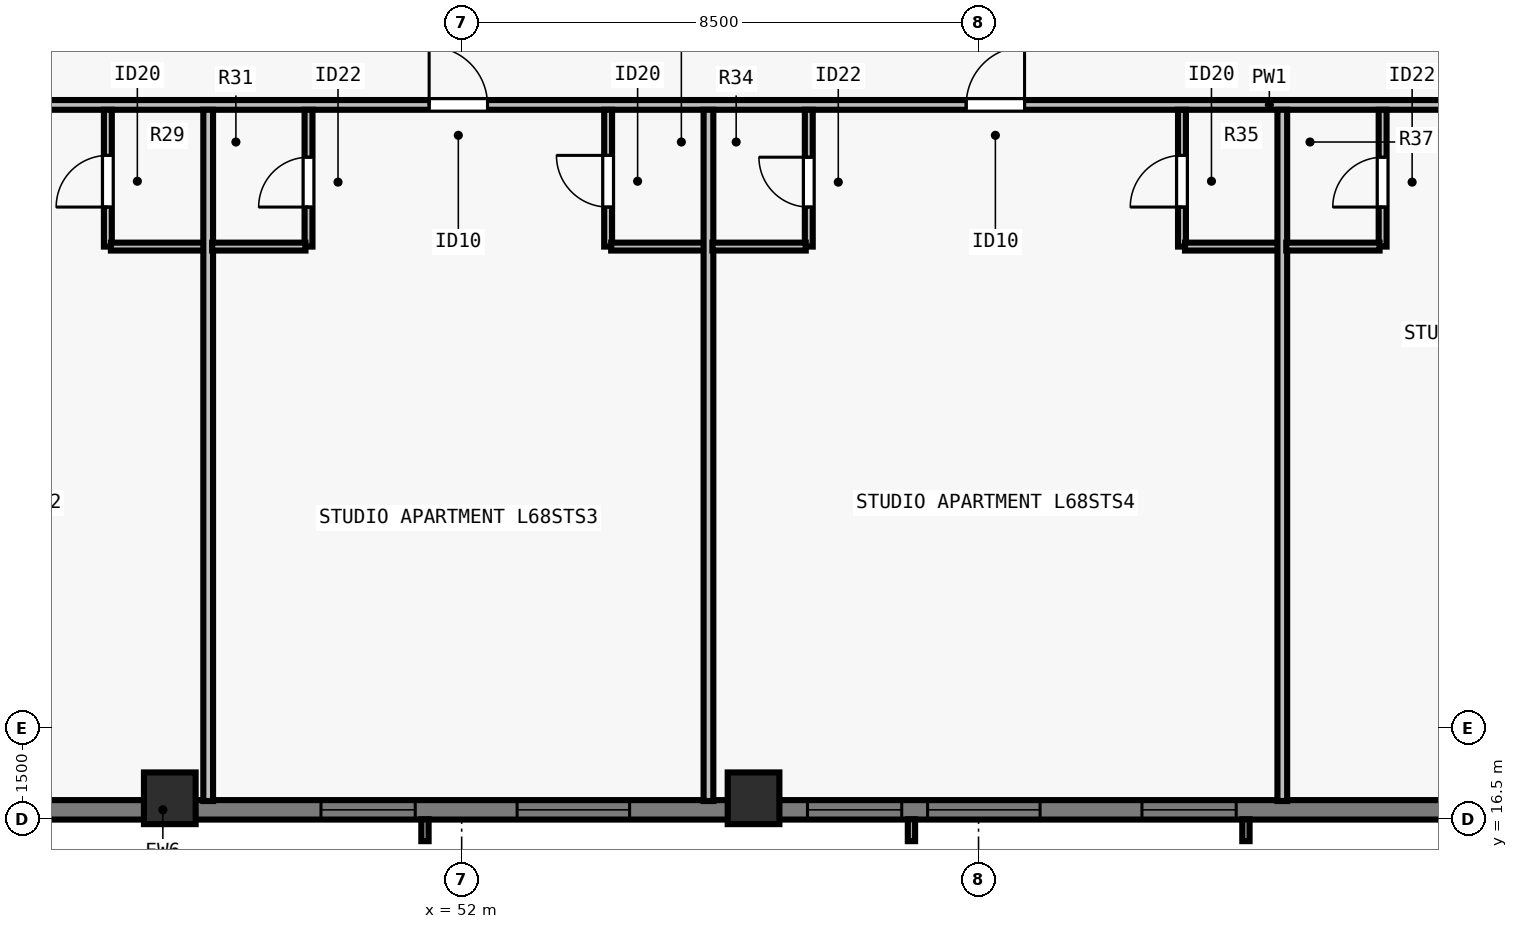
"""IFC4 building model, lengths in metres.
Left out: names, types, materials, properties, quantities, classifications, styles, units other than length and angle.
Written with IfcOpenShell. Run it as: python <this file> out.ifc"""

import sys

from ifc_helpers import new_model, si_unit, direction, frame, frame_2d, origin, origin_2d, place, context, subcontext, project, spatial, rectangle, extrude, element, fill, save


model = new_model("IFC4")
c1 = context("Model", 3, precision=1e-05, world=origin(), true_north=direction((0.0, 1.0)))
c2 = subcontext(c1, "Body", "Model", "MODEL_VIEW")
j1 = project(units=[si_unit("LENGTHUNIT", "METRE"), si_unit("PLANEANGLEUNIT", "RADIAN")], contexts=[c1])
p1 = place(None, origin())
s1 = spatial("IfcSite", under=j1, at=p1, CompositionType="ELEMENT")
p2 = place(p1, origin())
s2 = spatial("IfcBuilding", under=s1, at=p2, CompositionType="ELEMENT")
p3 = place(p2, frame((0.0, 0.0, 248.0)))
s3 = spatial("IfcBuildingStorey", under=s2, at=p3, CompositionType="ELEMENT", Elevation=248.0)
for number, where, z_axis, x_axis in (
    (1, (47.2, 16.85, 0.0), (0.0, 0.0, 1.0), (1.0, 0.0, 0.0)),
    (2, (56.8, 16.85, 0.0), (0.0, 0.0, 1.0), (1.0, 0.0, 0.0)),
):
    element("IfcColumn", number, at=place(p3, frame(where, z_axis=z_axis, x_axis=x_axis)), inside=s3, PredefinedType="COLUMN", context=c2, shape_type="SweptSolid", body=[
        extrude(rectangle(XDim=0.85, YDim=0.85, at=origin_2d()), origin(), (0.0, 0.0, 1.0), 3.5),
    ])
p4 = place(p3, frame((69.5, 16.66, 0.0), z_axis=(0.0, 0.0, 1.0), x_axis=(-1.0, 0.0, 0.0)))
e3 = element("IfcWall", 3, at=p4, inside=s3, PredefinedType="SOLIDWALL", context=c2, shape_type="SweptSolid", body=[
    extrude(rectangle(XDim=34.702, YDim=0.32, at=frame_2d((17.351, 0.0))), origin(), (0.0, 0.0, 1.0), 3.29),
])
p5 = place(p4, frame((4.763, 0.0, 0.8)))
e4 = element("IfcOpeningElement", 4, at=p5, cuts=e3, PredefinedType="OPENING", context=c2, shape_type="SweptSolid", body=[
    extrude(rectangle(XDim=1.55, YDim=1.678, at=frame_2d((0.775, 0.839))), frame((0.0, 0.17, 0.0), z_axis=(0.0, -1.0, 0.0), x_axis=(1.0, 0.0, 0.0)), (0.0, 0.0, 1.0), 0.34),
])
p6 = place(p4, frame((7.988, 0.0, 0.8)))
e5 = element("IfcOpeningElement", 5, at=p6, cuts=e3, PredefinedType="OPENING", context=c2, shape_type="SweptSolid", body=[
    extrude(rectangle(XDim=1.85, YDim=1.678, at=frame_2d((0.925, 0.839))), frame((0.0, 0.17, 0.0), z_axis=(0.0, -1.0, 0.0), x_axis=(1.0, 0.0, 0.0)), (0.0, 0.0, 1.0), 0.34),
])
p7 = place(p4, frame((10.263, 0.0, 0.8)))
e6 = element("IfcOpeningElement", 6, at=p7, cuts=e3, PredefinedType="OPENING", context=c2, shape_type="SweptSolid", body=[
    extrude(rectangle(XDim=1.55, YDim=1.678, at=frame_2d((0.775, 0.839))), frame((0.0, 0.17, 0.0), z_axis=(0.0, -1.0, 0.0), x_axis=(1.0, 0.0, 0.0)), (0.0, 0.0, 1.0), 0.34),
])
p8 = place(p4, frame((14.738, 0.0, 0.8)))
e7 = element("IfcOpeningElement", 7, at=p8, cuts=e3, PredefinedType="OPENING", context=c2, shape_type="SweptSolid", body=[
    extrude(rectangle(XDim=1.85, YDim=1.678, at=frame_2d((0.925, 0.839))), frame((0.0, 0.17, 0.0), z_axis=(0.0, -1.0, 0.0), x_axis=(1.0, 0.0, 0.0)), (0.0, 0.0, 1.0), 0.34),
])
p9 = place(p4, frame((18.264, 0.0, 0.8)))
e8 = element("IfcOpeningElement", 8, at=p9, cuts=e3, PredefinedType="OPENING", context=c2, shape_type="SweptSolid", body=[
    extrude(rectangle(XDim=1.55, YDim=1.678, at=frame_2d((0.775, 0.839))), frame((0.0, 0.17, 0.0), z_axis=(0.0, -1.0, 0.0), x_axis=(1.0, 0.0, 0.0)), (0.0, 0.0, 1.0), 0.34),
])
p10 = place(p4, frame((25.014, 0.0, 0.8)))
e9 = element("IfcOpeningElement", 9, at=p10, cuts=e3, PredefinedType="OPENING", context=c2, shape_type="SweptSolid", body=[
    extrude(rectangle(XDim=1.55, YDim=1.678, at=frame_2d((0.775, 0.839))), frame((0.0, 0.17, 0.0), z_axis=(0.0, -1.0, 0.0), x_axis=(1.0, 0.0, 0.0)), (0.0, 0.0, 1.0), 0.34),
])
p11 = place(p4, frame((28.24, 0.0, 0.8)))
e10 = element("IfcOpeningElement", 10, at=p11, cuts=e3, PredefinedType="OPENING", context=c2, shape_type="SweptSolid", body=[
    extrude(rectangle(XDim=1.85, YDim=1.678, at=frame_2d((0.925, 0.839))), frame((0.0, 0.17, 0.0), z_axis=(0.0, -1.0, 0.0), x_axis=(1.0, 0.0, 0.0)), (0.0, 0.0, 1.0), 0.34),
])
p12 = place(p3, frame((29.915, 28.252, 0.0), z_axis=(0.0, 0.0, 1.0), x_axis=(1.0, 0.0, 0.0)))
e11 = element("IfcWall", 11, at=p12, inside=s3, PredefinedType="PARTITIONING", context=c2, shape_type="SweptSolid", body=[
    extrude(rectangle(XDim=44.28, YDim=0.16, at=frame_2d((22.14, 0.0))), origin(), (0.0, 0.0, 1.0), 2.958),
])
p13 = place(p12, frame((5.002, 0.0, 0.0)))
e12 = element("IfcOpeningElement", 12, at=p13, cuts=e11, PredefinedType="OPENING", context=c2, shape_type="SweptSolid", body=[
    extrude(rectangle(XDim=0.96, YDim=2.18, at=frame_2d((0.48, 1.09))), frame((0.0, 0.09, 0.0), z_axis=(0.0, -1.0, 0.0), x_axis=(1.0, 0.0, 0.0)), (0.0, 0.0, 1.0), 0.18),
])
p14 = place(p12, frame((12.718, 0.0, 0.0)))
e13 = element("IfcOpeningElement", 13, at=p14, cuts=e11, PredefinedType="OPENING", context=c2, shape_type="SweptSolid", body=[
    extrude(rectangle(XDim=0.96, YDim=2.18, at=frame_2d((0.48, 1.09))), frame((0.0, 0.09, 0.0), z_axis=(0.0, -1.0, 0.0), x_axis=(1.0, 0.0, 0.0)), (0.0, 0.0, 1.0), 0.18),
])
p15 = place(p12, frame((21.55, 0.0, 0.0)))
e14 = element("IfcOpeningElement", 14, at=p15, cuts=e11, PredefinedType="OPENING", context=c2, shape_type="SweptSolid", body=[
    extrude(rectangle(XDim=0.96, YDim=2.18, at=frame_2d((0.48, 1.09))), frame((0.0, 0.09, 0.0), z_axis=(0.0, -1.0, 0.0), x_axis=(1.0, 0.0, 0.0)), (0.0, 0.0, 1.0), 0.18),
])
p16 = place(p12, frame((30.382, 0.0, 0.0)))
e15 = element("IfcOpeningElement", 15, at=p16, cuts=e11, PredefinedType="OPENING", context=c2, shape_type="SweptSolid", body=[
    extrude(rectangle(XDim=0.96, YDim=2.18, at=frame_2d((0.48, 1.09))), frame((0.0, 0.09, 0.0), z_axis=(0.0, -1.0, 0.0), x_axis=(1.0, 0.0, 0.0)), (0.0, 0.0, 1.0), 0.18),
])
p17 = place(p12, frame((39.393, 0.0, 0.0)))
e16 = element("IfcOpeningElement", 16, at=p17, cuts=e11, PredefinedType="OPENING", context=c2, shape_type="SweptSolid", body=[
    extrude(rectangle(XDim=0.96, YDim=2.18, at=frame_2d((0.48, 1.09))), frame((0.0, 0.09, 0.0), z_axis=(0.0, -1.0, 0.0), x_axis=(1.0, 0.0, 0.0)), (0.0, 0.0, 1.0), 0.18),
])
p18 = place(p3, frame((46.181, 25.923, 0.0), z_axis=(0.0, 0.0, 1.0), x_axis=(0.0, 1.0, 0.0)))
e17 = element("IfcWall", 17, at=p18, inside=s3, PredefinedType="PLUMBINGWALL", context=c2, shape_type="SweptSolid", body=[
    extrude(rectangle(XDim=2.25, YDim=0.13, at=frame_2d((1.125, 0.0))), origin(), (0.0, 0.0, 1.0), 3.29),
])
p19 = place(p18, frame((0.65, 0.0, 0.0)))
e18 = element("IfcOpeningElement", 18, at=p19, cuts=e17, PredefinedType="OPENING", context=c2, shape_type="SweptSolid", body=[
    extrude(rectangle(XDim=0.85, YDim=2.1, at=frame_2d((0.425, 1.05))), frame((0.0, 0.075, 0.0), z_axis=(0.0, -1.0, 0.0), x_axis=(1.0, 0.0, 0.0)), (0.0, 0.0, 1.0), 0.15),
])
p20 = place(p3, frame((46.231, 25.923, 0.0), z_axis=(0.0, 0.0, 1.0), x_axis=(1.0, 0.0, 0.0)))
e19 = element("IfcWall", 19, at=p20, inside=s3, PredefinedType="PLUMBINGWALL", context=c2, shape_type="SweptSolid", body=[
    extrude(rectangle(XDim=1.6, YDim=0.13, at=frame_2d((0.8, 0.0))), origin(), (0.0, 0.0, 1.0), 3.29),
])
p21 = place(p3, frame((47.832, 16.805, 0.0), z_axis=(0.0, 0.0, 1.0), x_axis=(0.0, 1.0, 0.0)))
e20 = element("IfcWall", 20, at=p21, inside=s3, PredefinedType="PARTITIONING", context=c2, shape_type="SweptSolid", body=[
    extrude(rectangle(XDim=11.368, YDim=0.16, at=frame_2d((5.684, 0.0))), origin(), (0.0, 0.0, 1.0), 2.958),
])
p22 = place(p3, frame((49.481, 25.923, 0.0), z_axis=(0.0, 0.0, 1.0), x_axis=(0.0, 1.0, 0.0)))
e21 = element("IfcWall", 21, at=p22, inside=s3, PredefinedType="PLUMBINGWALL", context=c2, shape_type="SweptSolid", body=[
    extrude(rectangle(XDim=2.25, YDim=0.13, at=frame_2d((1.125, 0.0))), origin(), (0.0, 0.0, 1.0), 3.29),
])
p23 = place(p22, frame((0.65, 0.0, 0.0)))
e22 = element("IfcOpeningElement", 22, at=p23, cuts=e21, PredefinedType="OPENING", context=c2, shape_type="SweptSolid", body=[
    extrude(rectangle(XDim=0.82, YDim=2.1, at=frame_2d((0.41, 1.05))), frame((0.0, 0.075, 0.0), z_axis=(0.0, -1.0, 0.0), x_axis=(1.0, 0.0, 0.0)), (0.0, 0.0, 1.0), 0.15),
])
p24 = place(p3, frame((47.896, 25.923, 0.0), z_axis=(0.0, 0.0, 1.0), x_axis=(1.0, 0.0, 0.0)))
e23 = element("IfcWall", 23, at=p24, inside=s3, PredefinedType="PLUMBINGWALL", context=c2, shape_type="SweptSolid", body=[
    extrude(rectangle(XDim=1.535, YDim=0.13, at=frame_2d((0.768, 0.0))), origin(), (0.0, 0.0, 1.0), 3.29),
])
p25 = place(p3, frame((54.408, 25.923, 0.0), z_axis=(0.0, 0.0, 1.0), x_axis=(0.0, 1.0, 0.0)))
e24 = element("IfcWall", 24, at=p25, inside=s3, PredefinedType="PLUMBINGWALL", context=c2, shape_type="SweptSolid", body=[
    extrude(rectangle(XDim=2.25, YDim=0.13, at=frame_2d((1.125, 0.0))), origin(), (0.0, 0.0, 1.0), 2.958),
])
p26 = place(p25, frame((0.65, 0.0, 0.0)))
e25 = element("IfcOpeningElement", 25, at=p26, cuts=e24, PredefinedType="OPENING", context=c2, shape_type="SweptSolid", body=[
    extrude(rectangle(XDim=0.85, YDim=2.1, at=frame_2d((0.425, 1.05))), frame((0.0, 0.075, 0.0), z_axis=(0.0, -1.0, 0.0), x_axis=(1.0, 0.0, 0.0)), (0.0, 0.0, 1.0), 0.15),
])
p27 = place(p3, frame((54.458, 25.923, 0.0), z_axis=(0.0, 0.0, 1.0), x_axis=(1.0, 0.0, 0.0)))
e26 = element("IfcWall", 26, at=p27, inside=s3, PredefinedType="PLUMBINGWALL", context=c2, shape_type="SweptSolid", body=[
    extrude(rectangle(XDim=1.6, YDim=0.13, at=frame_2d((0.8, 0.0))), origin(), (0.0, 0.0, 1.0), 3.29),
])
p28 = place(p3, frame((56.059, 16.805, 0.0), z_axis=(0.0, 0.0, 1.0), x_axis=(0.0, 1.0, 0.0)))
e27 = element("IfcWall", 27, at=p28, inside=s3, PredefinedType="PARTITIONING", context=c2, shape_type="SweptSolid", body=[
    extrude(rectangle(XDim=11.368, YDim=0.16, at=frame_2d((5.684, 0.0))), origin(), (0.0, 0.0, 1.0), 3.29),
])
p29 = place(p3, frame((57.708, 25.923, 0.0), z_axis=(0.0, 0.0, 1.0), x_axis=(0.0, 1.0, 0.0)))
e28 = element("IfcWall", 28, at=p29, inside=s3, PredefinedType="PLUMBINGWALL", context=c2, shape_type="SweptSolid", body=[
    extrude(rectangle(XDim=2.25, YDim=0.13, at=frame_2d((1.125, 0.0))), origin(), (0.0, 0.0, 1.0), 3.29),
])
p30 = place(p29, frame((0.65, 0.0, 0.0)))
e29 = element("IfcOpeningElement", 29, at=p30, cuts=e28, PredefinedType="OPENING", context=c2, shape_type="SweptSolid", body=[
    extrude(rectangle(XDim=0.82, YDim=2.1, at=frame_2d((0.41, 1.05))), frame((0.0, 0.075, 0.0), z_axis=(0.0, -1.0, 0.0), x_axis=(1.0, 0.0, 0.0)), (0.0, 0.0, 1.0), 0.15),
])
p31 = place(p3, frame((56.124, 25.923, 0.0), z_axis=(0.0, 0.0, 1.0), x_axis=(1.0, 0.0, 0.0)))
e30 = element("IfcWall", 30, at=p31, inside=s3, PredefinedType="PLUMBINGWALL", context=c2, shape_type="SweptSolid", body=[
    extrude(rectangle(XDim=1.535, YDim=0.13, at=frame_2d((0.768, 0.0))), origin(), (0.0, 0.0, 1.0), 3.29),
])
p32 = place(p3, frame((63.845, 25.923, 0.0), z_axis=(0.0, 0.0, 1.0), x_axis=(0.0, 1.0, 0.0)))
e31 = element("IfcWall", 31, at=p32, inside=s3, PredefinedType="PLUMBINGWALL", context=c2, shape_type="SweptSolid", body=[
    extrude(rectangle(XDim=2.25, YDim=0.13, at=frame_2d((1.125, 0.0))), origin(), (0.0, 0.0, 1.0), 3.29),
])
p33 = place(p32, frame((0.65, 0.0, 0.0)))
e32 = element("IfcOpeningElement", 32, at=p33, cuts=e31, PredefinedType="OPENING", context=c2, shape_type="SweptSolid", body=[
    extrude(rectangle(XDim=0.85, YDim=2.1, at=frame_2d((0.425, 1.05))), frame((0.0, 0.075, 0.0), z_axis=(0.0, -1.0, 0.0), x_axis=(1.0, 0.0, 0.0)), (0.0, 0.0, 1.0), 0.15),
])
p34 = place(p3, frame((63.896, 25.923, 0.0), z_axis=(0.0, 0.0, 1.0), x_axis=(1.0, 0.0, 0.0)))
e33 = element("IfcWall", 33, at=p34, inside=s3, PredefinedType="PLUMBINGWALL", context=c2, shape_type="SweptSolid", body=[
    extrude(rectangle(XDim=1.6, YDim=0.13, at=frame_2d((0.8, 0.0))), origin(), (0.0, 0.0, 1.0), 3.29),
])
p35 = place(p3, frame((65.496, 16.805, 0.0), z_axis=(0.0, 0.0, 1.0), x_axis=(0.0, 1.0, 0.0)))
e34 = element("IfcWall", 34, at=p35, inside=s3, PredefinedType="PARTITIONING", context=c2, shape_type="SweptSolid", body=[
    extrude(rectangle(XDim=11.368, YDim=0.16, at=frame_2d((5.684, 0.0))), origin(), (0.0, 0.0, 1.0), 2.573),
])
p36 = place(p3, frame((67.146, 25.923, 0.0), z_axis=(0.0, 0.0, 1.0), x_axis=(0.0, 1.0, 0.0)))
e35 = element("IfcWall", 35, at=p36, inside=s3, PredefinedType="PLUMBINGWALL", context=c2, shape_type="SweptSolid", body=[
    extrude(rectangle(XDim=2.25, YDim=0.13, at=frame_2d((1.125, 0.0))), origin(), (0.0, 0.0, 1.0), 3.29),
])
p37 = place(p36, frame((0.65, 0.0, 0.0)))
e36 = element("IfcOpeningElement", 36, at=p37, cuts=e35, PredefinedType="OPENING", context=c2, shape_type="SweptSolid", body=[
    extrude(rectangle(XDim=0.82, YDim=2.1, at=frame_2d((0.41, 1.05))), frame((0.0, 0.075, 0.0), z_axis=(0.0, -1.0, 0.0), x_axis=(1.0, 0.0, 0.0)), (0.0, 0.0, 1.0), 0.15),
])
p38 = place(p3, frame((65.561, 25.923, 0.0), z_axis=(0.0, 0.0, 1.0), x_axis=(1.0, 0.0, 0.0)))
e37 = element("IfcWall", 37, at=p38, inside=s3, PredefinedType="PLUMBINGWALL", context=c2, shape_type="SweptSolid", body=[
    extrude(rectangle(XDim=1.535, YDim=0.13, at=frame_2d((0.768, 0.0))), origin(), (0.0, 0.0, 1.0), 3.29),
])
p39 = place(p5, origin())
e38 = element("IfcWindow", 38, at=p39, inside=s3, PartitioningType="SINGLE_PANEL", PredefinedType="WINDOW", context=c2, shape_type="SweptSolid", body=[
    extrude(rectangle(XDim=1.55, YDim=1.678, at=frame_2d((0.775, 0.839))), frame((0.0, -0.05, 0.0), z_axis=(0.0, -1.0, 0.0), x_axis=(1.0, 0.0, 0.0)), (0.0, 0.0, 1.0), 0.06),
])
fill(e4, e38)
p40 = place(p6, origin())
e39 = element("IfcWindow", 39, at=p40, inside=s3, PartitioningType="SINGLE_PANEL", PredefinedType="WINDOW", context=c2, shape_type="SweptSolid", body=[
    extrude(rectangle(XDim=1.85, YDim=1.678, at=frame_2d((0.925, 0.839))), frame((0.0, -0.05, 0.0), z_axis=(0.0, -1.0, 0.0), x_axis=(1.0, 0.0, 0.0)), (0.0, 0.0, 1.0), 0.06),
])
fill(e5, e39)
p41 = place(p7, origin())
e40 = element("IfcWindow", 40, at=p41, inside=s3, PartitioningType="SINGLE_PANEL", PredefinedType="WINDOW", context=c2, shape_type="SweptSolid", body=[
    extrude(rectangle(XDim=1.55, YDim=1.678, at=frame_2d((0.775, 0.839))), frame((0.0, -0.05, 0.0), z_axis=(0.0, -1.0, 0.0), x_axis=(1.0, 0.0, 0.0)), (0.0, 0.0, 1.0), 0.06),
])
fill(e6, e40)
p42 = place(p8, origin())
e41 = element("IfcWindow", 41, at=p42, inside=s3, PartitioningType="SINGLE_PANEL", PredefinedType="WINDOW", context=c2, shape_type="SweptSolid", body=[
    extrude(rectangle(XDim=1.85, YDim=1.678, at=frame_2d((0.925, 0.839))), frame((0.0, -0.05, 0.0), z_axis=(0.0, -1.0, 0.0), x_axis=(1.0, 0.0, 0.0)), (0.0, 0.0, 1.0), 0.06),
])
fill(e7, e41)
p43 = place(p9, origin())
e42 = element("IfcWindow", 42, at=p43, inside=s3, PartitioningType="SINGLE_PANEL", PredefinedType="WINDOW", context=c2, shape_type="SweptSolid", body=[
    extrude(rectangle(XDim=1.55, YDim=1.678, at=frame_2d((0.775, 0.839))), frame((0.0, -0.05, 0.0), z_axis=(0.0, -1.0, 0.0), x_axis=(1.0, 0.0, 0.0)), (0.0, 0.0, 1.0), 0.06),
])
fill(e8, e42)
p44 = place(p19, origin())
e43 = element("IfcDoor", 43, at=p44, inside=s3, OperationType="SINGLE_SWING_LEFT", PredefinedType="DOOR", context=c2, shape_type="SweptSolid", body=[
    extrude(rectangle(XDim=0.85, YDim=2.1, at=frame_2d((0.425, 1.05))), frame((0.0, 0.025, 0.0), z_axis=(0.0, -1.0, 0.0), x_axis=(1.0, 0.0, 0.0)), (0.0, 0.0, 1.0), 0.05),
])
fill(e18, e43)
p45 = place(p23, origin())
e44 = element("IfcDoor", 44, at=p45, inside=s3, OperationType="SINGLE_SWING_LEFT", PredefinedType="DOOR", context=c2, shape_type="SweptSolid", body=[
    extrude(rectangle(XDim=0.82, YDim=2.1, at=frame_2d((0.41, 1.05))), frame((0.0, 0.025, 0.0), z_axis=(0.0, -1.0, 0.0), x_axis=(1.0, 0.0, 0.0)), (0.0, 0.0, 1.0), 0.05),
])
fill(e22, e44)
p46 = place(p26, origin())
e45 = element("IfcDoor", 45, at=p46, inside=s3, OperationType="SINGLE_SWING_RIGHT", PredefinedType="DOOR", context=c2, shape_type="SweptSolid", body=[
    extrude(rectangle(XDim=0.85, YDim=2.1, at=frame_2d((0.425, 1.05))), frame((0.0, 0.025, 0.0), z_axis=(0.0, -1.0, 0.0), x_axis=(1.0, 0.0, 0.0)), (0.0, 0.0, 1.0), 0.05),
])
fill(e25, e45)
p47 = place(p15, origin())
e46 = element("IfcDoor", 46, at=p47, inside=s3, OperationType="SINGLE_SWING_LEFT", PredefinedType="DOOR", context=c2, shape_type="SweptSolid", body=[
    extrude(rectangle(XDim=0.96, YDim=2.18, at=frame_2d((0.48, 1.09))), frame((0.0, 0.025, 0.0), z_axis=(0.0, -1.0, 0.0), x_axis=(1.0, 0.0, 0.0)), (0.0, 0.0, 1.0), 0.05),
])
fill(e14, e46)
p48 = place(p30, origin())
e47 = element("IfcDoor", 47, at=p48, inside=s3, OperationType="SINGLE_SWING_RIGHT", PredefinedType="DOOR", context=c2, shape_type="SweptSolid", body=[
    extrude(rectangle(XDim=0.82, YDim=2.1, at=frame_2d((0.41, 1.05))), frame((0.0, 0.025, 0.0), z_axis=(0.0, -1.0, 0.0), x_axis=(1.0, 0.0, 0.0)), (0.0, 0.0, 1.0), 0.05),
])
fill(e29, e47)
p49 = place(p33, origin())
e48 = element("IfcDoor", 48, at=p49, inside=s3, OperationType="SINGLE_SWING_LEFT", PredefinedType="DOOR", context=c2, shape_type="SweptSolid", body=[
    extrude(rectangle(XDim=0.85, YDim=2.1, at=frame_2d((0.425, 1.05))), frame((0.0, 0.025, 0.0), z_axis=(0.0, -1.0, 0.0), x_axis=(1.0, 0.0, 0.0)), (0.0, 0.0, 1.0), 0.05),
])
fill(e32, e48)
p50 = place(p16, origin())
e49 = element("IfcDoor", 49, at=p50, inside=s3, OperationType="SINGLE_SWING_RIGHT", PredefinedType="DOOR", context=c2, shape_type="SweptSolid", body=[
    extrude(rectangle(XDim=0.96, YDim=2.18, at=frame_2d((0.48, 1.09))), frame((0.0, 0.025, 0.0), z_axis=(0.0, -1.0, 0.0), x_axis=(1.0, 0.0, 0.0)), (0.0, 0.0, 1.0), 0.05),
])
fill(e15, e49)
p51 = place(p37, origin())
e50 = element("IfcDoor", 50, at=p51, inside=s3, OperationType="SINGLE_SWING_LEFT", PredefinedType="DOOR", context=c2, shape_type="SweptSolid", body=[
    extrude(rectangle(XDim=0.82, YDim=2.1, at=frame_2d((0.41, 1.05))), frame((0.0, 0.025, 0.0), z_axis=(0.0, -1.0, 0.0), x_axis=(1.0, 0.0, 0.0)), (0.0, 0.0, 1.0), 0.05),
])
fill(e36, e50)
save(model, sys.argv[1])
